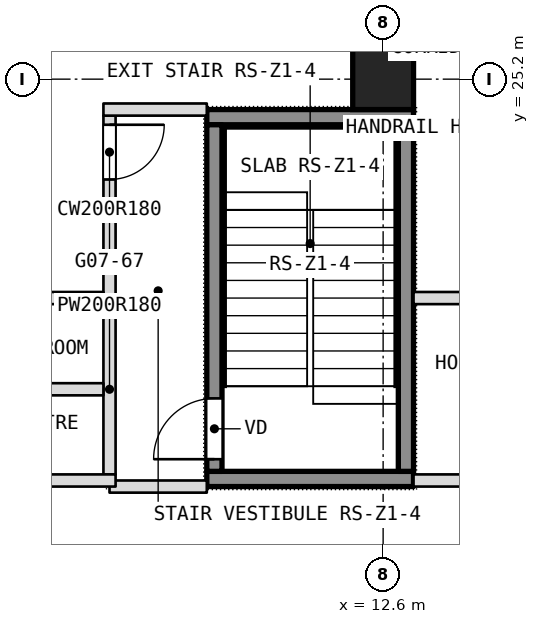
"""IFC4 building model, lengths in metres.
Left out: names, types, materials, properties, quantities, classifications, styles, units other than length and angle.
Written with IfcOpenShell. Run it as: python <this file> out.ifc"""

import sys

from ifc_helpers import new_model, si_unit, direction, frame, frame_2d, origin, origin_2d, place, context, subcontext, project, spatial, rectangle, extrude, element, fill, save


model = new_model("IFC4")
c1 = context("Model", 3, precision=1e-05, world=origin(), true_north=direction((0.0, 1.0)))
c2 = subcontext(c1, "Body", "Model", "MODEL_VIEW")
j1 = project(units=[si_unit("LENGTHUNIT", "METRE"), si_unit("PLANEANGLEUNIT", "RADIAN")], contexts=[c1])
p1 = place(None, origin())
s1 = spatial("IfcSite", under=j1, at=p1, CompositionType="ELEMENT")
p2 = place(p1, origin())
s2 = spatial("IfcBuilding", under=s1, at=p2, CompositionType="ELEMENT")
p3 = place(p2, frame((0.0, 0.0, 83.3)))
s3 = spatial("IfcBuildingStorey", under=s2, at=p3, CompositionType="ELEMENT", Elevation=83.3)
p4 = place(p3, frame((12.6, 25.2, 0.0), z_axis=(0.0, 0.0, 1.0), x_axis=(1.0, 0.0, 0.0)))
e1 = element("IfcColumn", 1, at=p4, inside=s3, PredefinedType="COLUMN", context=c2, shape_type="SweptSolid", body=[
    extrude(rectangle(XDim=1.0, YDim=1.0, at=origin_2d()), origin(), (0.0, 0.0, 1.0), 3.6),
])
p5 = place(p3, frame((8.1, 18.7, 0.0), z_axis=(0.0, 0.0, 1.0), x_axis=(0.0, 1.0, 0.0)))
e2 = element("IfcWall", 2, at=p5, inside=s3, PredefinedType="PARTITIONING", context=c2, shape_type="SweptSolid", body=[
    extrude(rectangle(XDim=2.8, YDim=0.2, at=frame_2d((1.4, 0.0))), origin(), (0.0, 0.0, 1.0), 3.3),
])
p6 = place(p3, frame((8.1, 21.5, 0.0), z_axis=(0.0, 0.0, 1.0), x_axis=(0.0, 1.0, 0.0)))
e3 = element("IfcWall", 3, at=p6, inside=s3, PredefinedType="PARTITIONING", context=c2, shape_type="SweptSolid", body=[
    extrude(rectangle(XDim=3.1, YDim=0.2, at=frame_2d((1.55, 0.0))), origin(), (0.0, 0.0, 1.0), 3.3),
])
p7 = place(p6, frame((2.05, 0.0, 0.0)))
e4 = element("IfcOpeningElement", 4, at=p7, cuts=e3, PredefinedType="OPENING", context=c2, shape_type="SweptSolid", body=[
    extrude(rectangle(XDim=0.9, YDim=2.1, at=frame_2d((0.45, 1.05))), frame((0.0, 0.1, 0.0), z_axis=(0.0, -1.0, 0.0), x_axis=(1.0, 0.0, 0.0)), (0.0, 0.0, 1.0), 0.2),
])
p8 = place(p3, frame((8.1, 18.5, 0.0), z_axis=(0.0, 0.0, 1.0), x_axis=(1.0, 0.0, 0.0)))
e5 = element("IfcWall", 5, at=p8, inside=s3, PredefinedType="PARTITIONING", context=c2, shape_type="SweptSolid", body=[
    extrude(rectangle(XDim=1.6, YDim=0.2, at=frame_2d((0.8, 0.0))), origin(), (0.0, 0.0, 1.0), 3.3),
])
p9 = place(p3, frame((-16.9, 18.6, 0.0), z_axis=(0.0, 0.0, 1.0), x_axis=(1.0, 0.0, 0.0)))
e6 = element("IfcWall", 6, at=p9, inside=s3, PredefinedType="PARTITIONING", context=c2, shape_type="SweptSolid", body=[
    extrude(rectangle(XDim=25.1, YDim=0.2, at=frame_2d((12.55, 0.0))), origin(), (0.0, 0.0, 1.0), 3.3),
])
p10 = place(p9, frame((1.7, 0.0, 0.0)))
e7 = element("IfcOpeningElement", 7, at=p10, cuts=e6, PredefinedType="OPENING", context=c2, shape_type="SweptSolid", body=[
    extrude(rectangle(XDim=1.0, YDim=2.1, at=frame_2d((0.5, 1.05))), frame((0.0, 0.1, 0.0), z_axis=(0.0, -1.0, 0.0), x_axis=(1.0, 0.0, 0.0)), (0.0, 0.0, 1.0), 0.2),
])
p11 = place(p9, frame((16.4, 0.0, 0.0)))
e8 = element("IfcOpeningElement", 8, at=p11, cuts=e6, PredefinedType="OPENING", context=c2, shape_type="SweptSolid", body=[
    extrude(rectangle(XDim=1.0, YDim=2.1, at=frame_2d((0.5, 1.05))), frame((0.0, 0.1, 0.0), z_axis=(0.0, -1.0, 0.0), x_axis=(1.0, 0.0, 0.0)), (0.0, 0.0, 1.0), 0.2),
])
p12 = place(p9, frame((8.0, 0.0, 0.0)))
e9 = element("IfcOpeningElement", 9, at=p12, cuts=e6, PredefinedType="OPENING", context=c2, shape_type="SweptSolid", body=[
    extrude(rectangle(XDim=1.0, YDim=2.1, at=frame_2d((0.5, 1.05))), frame((0.0, 0.1, 0.0), z_axis=(0.0, -1.0, 0.0), x_axis=(1.0, 0.0, 0.0)), (0.0, 0.0, 1.0), 0.2),
])
p13 = place(p9, frame((22.55, 0.0, 0.0)))
e10 = element("IfcOpeningElement", 10, at=p13, cuts=e6, PredefinedType="OPENING", context=c2, shape_type="SweptSolid", body=[
    extrude(rectangle(XDim=1.0, YDim=2.1, at=frame_2d((0.5, 1.05))), frame((0.0, 0.1, 0.0), z_axis=(0.0, -1.0, 0.0), x_axis=(1.0, 0.0, 0.0)), (0.0, 0.0, 1.0), 0.2),
])
p14 = place(p3, frame((13.1, 18.6, 0.0), z_axis=(0.0, 0.0, 1.0), x_axis=(1.0, 0.0, 0.0)))
e11 = element("IfcWall", 11, at=p14, inside=s3, PredefinedType="PARTITIONING", context=c2, shape_type="SweptSolid", body=[
    extrude(rectangle(XDim=3.8, YDim=0.2, at=frame_2d((1.9, 0.0))), origin(), (0.0, 0.0, 1.0), 3.3),
])
p15 = place(p14, frame((1.35, 0.0, 0.0)))
e12 = element("IfcOpeningElement", 12, at=p15, cuts=e11, PredefinedType="OPENING", context=c2, shape_type="SweptSolid", body=[
    extrude(rectangle(XDim=1.0, YDim=2.1, at=frame_2d((0.5, 1.05))), frame((0.0, 0.1, 0.0), z_axis=(0.0, -1.0, 0.0), x_axis=(1.0, 0.0, 0.0)), (0.0, 0.0, 1.0), 0.2),
])
p16 = place(p3, frame((4.3, 20.1, 0.0), z_axis=(0.0, 0.0, 1.0), x_axis=(1.0, 0.0, 0.0)))
e13 = element("IfcWall", 13, at=p16, inside=s3, PredefinedType="PARTITIONING", context=c2, shape_type="SweptSolid", body=[
    extrude(rectangle(XDim=3.7, YDim=0.2, at=frame_2d((1.85, 0.0))), origin(), (0.0, 0.0, 1.0), 3.3),
])
p17 = place(p3, frame((-16.7, 21.6, 0.0), z_axis=(0.0, 0.0, 1.0), x_axis=(1.0, 0.0, 0.0)))
e14 = element("IfcWall", 14, at=p17, inside=s3, PredefinedType="PARTITIONING", context=c2, shape_type="SweptSolid", body=[
    extrude(rectangle(XDim=24.7, YDim=0.2, at=frame_2d((12.35, 0.0))), origin(), (0.0, 0.0, 1.0), 3.3),
])
p18 = place(p17, frame((7.8, 0.0, 0.0)))
e15 = element("IfcOpeningElement", 15, at=p18, cuts=e14, PredefinedType="OPENING", context=c2, shape_type="SweptSolid", body=[
    extrude(rectangle(XDim=1.0, YDim=2.1, at=frame_2d((0.5, 1.05))), frame((0.0, 0.1, 0.0), z_axis=(0.0, -1.0, 0.0), x_axis=(1.0, 0.0, 0.0)), (0.0, 0.0, 1.0), 0.2),
])
p19 = place(p17, frame((22.25, 0.0, 0.0)))
e16 = element("IfcOpeningElement", 16, at=p19, cuts=e14, PredefinedType="OPENING", context=c2, shape_type="SweptSolid", body=[
    extrude(rectangle(XDim=1.0, YDim=2.1, at=frame_2d((0.5, 1.05))), frame((0.0, 0.1, 0.0), z_axis=(0.0, -1.0, 0.0), x_axis=(1.0, 0.0, 0.0)), (0.0, 0.0, 1.0), 0.2),
])
p20 = place(p3, frame((13.1, 21.6, 0.0), z_axis=(0.0, 0.0, 1.0), x_axis=(1.0, 0.0, 0.0)))
e17 = element("IfcWall", 17, at=p20, inside=s3, PredefinedType="PARTITIONING", context=c2, shape_type="SweptSolid", body=[
    extrude(rectangle(XDim=3.6, YDim=0.2, at=frame_2d((1.8, 0.0))), origin(), (0.0, 0.0, 1.0), 3.3),
])
p21 = place(p3, frame((8.0, 24.7, 0.0), z_axis=(0.0, 0.0, 1.0), x_axis=(1.0, 0.0, 0.0)))
e18 = element("IfcWall", 18, at=p21, inside=s3, PredefinedType="PARTITIONING", context=c2, shape_type="SweptSolid", body=[
    extrude(rectangle(XDim=1.7, YDim=0.2, at=frame_2d((0.85, 0.0))), origin(), (0.0, 0.0, 1.0), 3.3),
])
for number, where, z_axis, x_axis in (
    (19, (9.7, 18.625, 0.1), (0.0, 0.0, 1.0), (1.0, 0.0, 0.0)),
    (20, (9.7, 24.575, 0.1), (0.0, 0.0, 1.0), (1.0, 0.0, 0.0)),
):
    element("IfcWall", number, at=place(p3, frame(where, z_axis=z_axis, x_axis=x_axis)), inside=s3, PredefinedType="SHEAR", context=c2, shape_type="SweptSolid", body=[
        extrude(rectangle(XDim=3.4, YDim=0.25, at=frame_2d((1.7, 0.0))), origin(), (0.0, 0.0, 1.0), 3.6),
    ])
p22 = place(p3, frame((9.825, 18.75, 0.1), z_axis=(0.0, 0.0, 1.0), x_axis=(0.0, 1.0, 0.0)))
e21 = element("IfcWall", 21, at=p22, inside=s3, PredefinedType="SHEAR", context=c2, shape_type="SweptSolid", body=[
    extrude(rectangle(XDim=5.7, YDim=0.25, at=frame_2d((2.85, 0.0))), origin(), (0.0, 0.0, 1.0), 3.6),
])
p23 = place(p22, frame((0.2, 0.0, 0.0)))
e22 = element("IfcOpeningElement", 22, at=p23, cuts=e21, PredefinedType="OPENING", context=c2, shape_type="SweptSolid", body=[
    extrude(rectangle(XDim=1.0, YDim=2.1, at=frame_2d((0.5, 1.05))), frame((0.0, 0.125, 0.0), z_axis=(0.0, -1.0, 0.0), x_axis=(1.0, 0.0, 0.0)), (0.0, 0.0, 1.0), 0.25),
])
p24 = place(p3, frame((12.975, 18.75, 0.1), z_axis=(0.0, 0.0, 1.0), x_axis=(0.0, 1.0, 0.0)))
e23 = element("IfcWall", 23, at=p24, inside=s3, PredefinedType="SHEAR", context=c2, shape_type="SweptSolid", body=[
    extrude(rectangle(XDim=5.7, YDim=0.25, at=frame_2d((2.85, 0.0))), origin(), (0.0, 0.0, 1.0), 3.6),
])
p25 = place(p7, origin())
e24 = element("IfcDoor", 24, at=p25, inside=s3, OperationType="SINGLE_SWING_LEFT", PredefinedType="DOOR", context=c2, shape_type="SweptSolid", body=[
    extrude(rectangle(XDim=0.9, YDim=2.1, at=frame_2d((0.45, 1.05))), frame((0.0, 0.025, 0.0), z_axis=(0.0, -1.0, 0.0), x_axis=(1.0, 0.0, 0.0)), (0.0, 0.0, 1.0), 0.05),
])
fill(e4, e24)
p26 = place(p23, origin())
e25 = element("IfcDoor", 25, at=p26, inside=s3, OperationType="SINGLE_SWING_LEFT", PredefinedType="DOOR", context=c2, shape_type="SweptSolid", body=[
    extrude(rectangle(XDim=1.0, YDim=2.1, at=frame_2d((0.5, 1.05))), frame((0.0, 0.025, 0.0), z_axis=(0.0, -1.0, 0.0), x_axis=(1.0, 0.0, 0.0)), (0.0, 0.0, 1.0), 0.05),
])
fill(e22, e25)
save(model, sys.argv[1])
